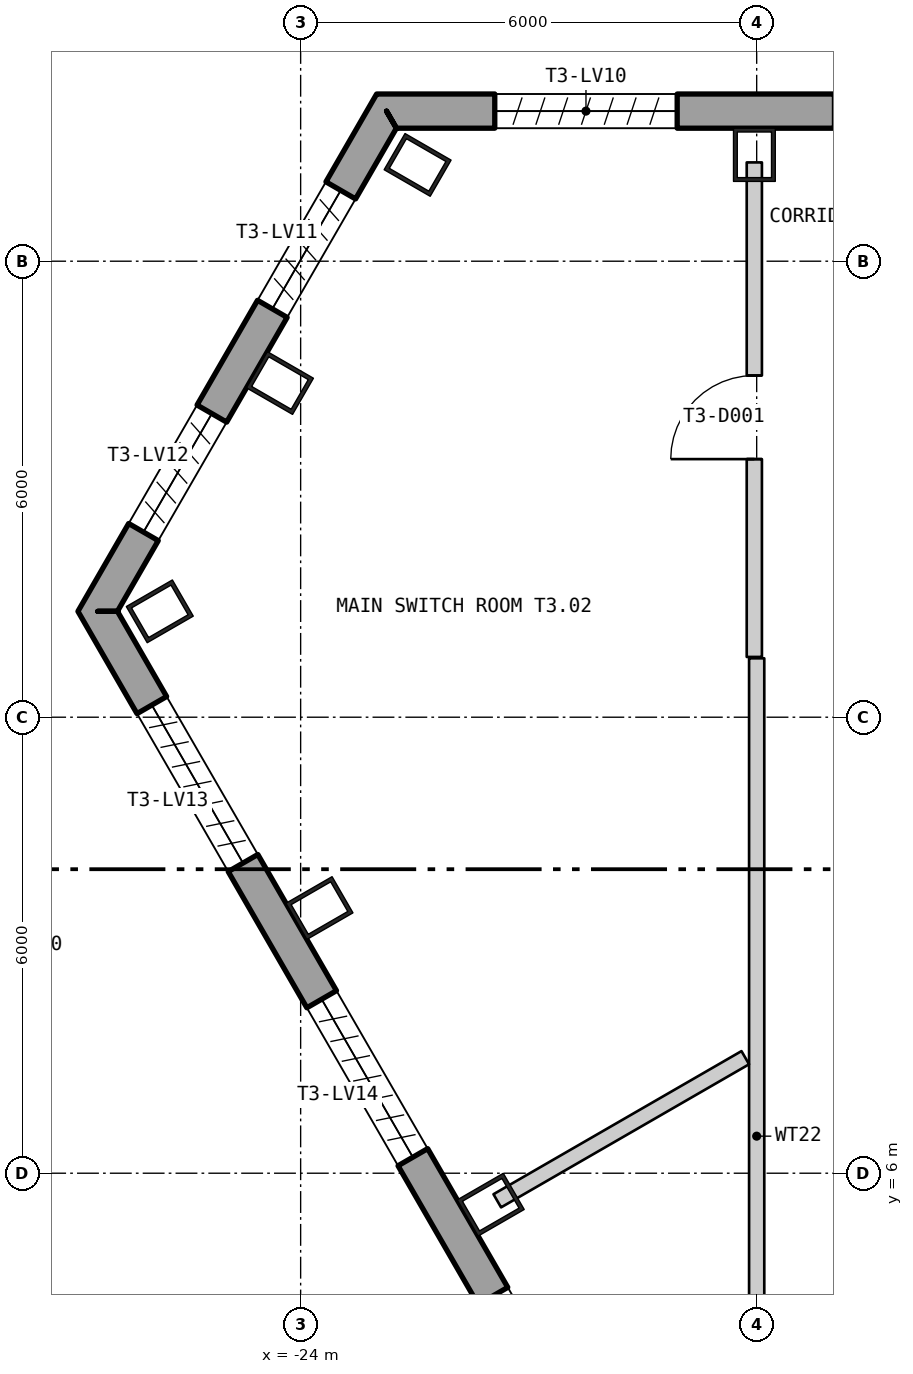
"""IFC4 building model, lengths in metres.
Left out: names, types, materials, properties, quantities, classifications, styles, units other than length and angle.
Written with IfcOpenShell. Run it as: python <this file> out.ifc"""

import sys

from ifc_helpers import new_model, si_unit, direction, frame, frame_2d, origin, origin_2d, place, context, subcontext, project, spatial, polyline, rectangle, hollow_rectangle, outline, extrude, element, fill, save


model = new_model("IFC4")
c1 = context("Model", 3, precision=1e-05, world=origin(), true_north=direction((0.0, 1.0)))
c2 = subcontext(c1, "Body", "Model", "MODEL_VIEW")
j1 = project(units=[si_unit("LENGTHUNIT", "METRE"), si_unit("PLANEANGLEUNIT", "RADIAN")], contexts=[c1])
p1 = place(None, origin())
s1 = spatial("IfcSite", under=j1, at=p1, CompositionType="ELEMENT")
p2 = place(p1, origin())
s2 = spatial("IfcBuilding", under=s1, at=p2, CompositionType="ELEMENT")
p3 = place(p2, frame((0.0, 0.0, 186.6)))
s3 = spatial("IfcBuildingStorey", under=s2, at=p3, CompositionType="ELEMENT", Elevation=186.6)
for number, where, z_axis, x_axis in (
    (1, (-18.03, 19.4, 0.0), (0.0, 0.0, 1.0), (-1.0, 0.0, 0.0)),
    (2, (-22.461, 19.267, 0.0), (0.0, 0.0, 1.0), (-0.5, -0.866, 0.0)),
    (3, (-24.272, 16.397, 0.0), (0.0, 0.0, 1.0), (-0.5, -0.866, 0.0)),
    (4, (-25.853, 13.393, 0.0), (0.0, 0.0, 1.0), (0.5, -0.866, 0.0)),
    (5, (-23.752, 9.489, 0.0), (0.0, 0.0, 1.0), (0.5, -0.866, 0.0)),
    (6, (-21.499, 5.586, 0.0), (0.0, 0.0, 1.0), (0.5, -0.866, 0.0)),
):
    element("IfcColumn", number, at=place(p3, frame(where, z_axis=z_axis, x_axis=x_axis)), inside=s3, PredefinedType="COLUMN", context=c2, shape_type="SweptSolid", body=[
        extrude(hollow_rectangle(XDim=0.55, YDim=0.7, WallThickness=0.05, at=origin_2d()), origin(), (0.0, 0.0, 1.0), 6.0),
    ])
p4 = place(p3, frame((22.87, 19.975, -0.4), z_axis=(0.0, 0.0, 1.0), x_axis=(-1.0, 0.0, 0.0)))
e7 = element("IfcWall", 7, at=p4, inside=s3, PredefinedType="SOLIDWALL", context=c2, shape_type="SweptSolid", body=[
    extrude(outline(polyline([(-0.13, -0.225), (45.87, -0.225), (45.61, 0.225), (0.13, 0.225), (-0.13, -0.225)])), origin(), (0.0, 0.0, 1.0), 6.0),
])
p5 = place(p4, frame((1.424, 0.0, 1.6)))
e8 = element("IfcOpeningElement", 8, at=p5, cuts=e7, PredefinedType="OPENING", context=c2, shape_type="SweptSolid", body=[
    extrude(rectangle(XDim=2.4, YDim=3.6, at=frame_2d((1.2, 1.8))), frame((0.0, 0.235, 0.0), z_axis=(0.0, -1.0, 0.0), x_axis=(1.0, 0.0, 0.0)), (0.0, 0.0, 1.0), 0.47),
])
p6 = place(p4, frame((5.893, 0.0, 1.6)))
e9 = element("IfcOpeningElement", 9, at=p6, cuts=e7, PredefinedType="OPENING", context=c2, shape_type="SweptSolid", body=[
    extrude(rectangle(XDim=2.4, YDim=3.6, at=frame_2d((1.2, 1.8))), frame((0.0, 0.235, 0.0), z_axis=(0.0, -1.0, 0.0), x_axis=(1.0, 0.0, 0.0)), (0.0, 0.0, 1.0), 0.47),
])
p7 = place(p4, frame((10.401, 0.0, 1.6)))
e10 = element("IfcOpeningElement", 10, at=p7, cuts=e7, PredefinedType="OPENING", context=c2, shape_type="SweptSolid", body=[
    extrude(rectangle(XDim=2.4, YDim=3.6, at=frame_2d((1.2, 1.8))), frame((0.0, 0.235, 0.0), z_axis=(0.0, -1.0, 0.0), x_axis=(1.0, 0.0, 0.0)), (0.0, 0.0, 1.0), 0.47),
])
p8 = place(p4, frame((14.909, 0.0, 1.6)))
e11 = element("IfcOpeningElement", 11, at=p8, cuts=e7, PredefinedType="OPENING", context=c2, shape_type="SweptSolid", body=[
    extrude(rectangle(XDim=2.4, YDim=3.6, at=frame_2d((1.2, 1.8))), frame((0.0, 0.235, 0.0), z_axis=(0.0, -1.0, 0.0), x_axis=(1.0, 0.0, 0.0)), (0.0, 0.0, 1.0), 0.47),
])
p9 = place(p4, frame((19.416, 0.0, 1.6)))
e12 = element("IfcOpeningElement", 12, at=p9, cuts=e7, PredefinedType="OPENING", context=c2, shape_type="SweptSolid", body=[
    extrude(rectangle(XDim=2.4, YDim=3.6, at=frame_2d((1.2, 1.8))), frame((0.0, 0.235, 0.0), z_axis=(0.0, -1.0, 0.0), x_axis=(1.0, 0.0, 0.0)), (0.0, 0.0, 1.0), 0.47),
])
p10 = place(p4, frame((23.924, 0.0, 1.6)))
e13 = element("IfcOpeningElement", 13, at=p10, cuts=e7, PredefinedType="OPENING", context=c2, shape_type="SweptSolid", body=[
    extrude(rectangle(XDim=2.4, YDim=3.6, at=frame_2d((1.2, 1.8))), frame((0.0, 0.235, 0.0), z_axis=(0.0, -1.0, 0.0), x_axis=(1.0, 0.0, 0.0)), (0.0, 0.0, 1.0), 0.47),
])
p11 = place(p4, frame((28.431, 0.0, 1.6)))
e14 = element("IfcOpeningElement", 14, at=p11, cuts=e7, PredefinedType="OPENING", context=c2, shape_type="SweptSolid", body=[
    extrude(rectangle(XDim=2.4, YDim=3.6, at=frame_2d((1.2, 1.8))), frame((0.0, 0.235, 0.0), z_axis=(0.0, -1.0, 0.0), x_axis=(1.0, 0.0, 0.0)), (0.0, 0.0, 1.0), 0.47),
])
p12 = place(p4, frame((32.939, 0.0, 1.6)))
e15 = element("IfcOpeningElement", 15, at=p12, cuts=e7, PredefinedType="OPENING", context=c2, shape_type="SweptSolid", body=[
    extrude(rectangle(XDim=2.4, YDim=3.6, at=frame_2d((1.2, 1.8))), frame((0.0, 0.235, 0.0), z_axis=(0.0, -1.0, 0.0), x_axis=(1.0, 0.0, 0.0)), (0.0, 0.0, 1.0), 0.47),
])
p13 = place(p4, frame((37.447, 0.0, 1.6)))
e16 = element("IfcOpeningElement", 16, at=p13, cuts=e7, PredefinedType="OPENING", context=c2, shape_type="SweptSolid", body=[
    extrude(rectangle(XDim=2.4, YDim=3.6, at=frame_2d((1.2, 1.8))), frame((0.0, 0.235, 0.0), z_axis=(0.0, -1.0, 0.0), x_axis=(1.0, 0.0, 0.0)), (0.0, 0.0, 1.0), 0.47),
])
p14 = place(p4, frame((41.916, 0.0, 1.6)))
e17 = element("IfcOpeningElement", 17, at=p14, cuts=e7, PredefinedType="OPENING", context=c2, shape_type="SweptSolid", body=[
    extrude(rectangle(XDim=2.4, YDim=3.6, at=frame_2d((1.2, 1.8))), frame((0.0, 0.235, 0.0), z_axis=(0.0, -1.0, 0.0), x_axis=(1.0, 0.0, 0.0)), (0.0, 0.0, 1.0), 0.47),
])
p15 = place(p3, frame((-22.87, 19.975, -0.4), z_axis=(0.0, 0.0, 1.0), x_axis=(-0.499998078497, -0.866026513162, 0.0)))
e18 = element("IfcWall", 18, at=p15, inside=s3, PredefinedType="SOLIDWALL", context=c2, shape_type="SweptSolid", body=[
    extrude(outline(polyline([(-0.13, -0.225), (7.73, -0.225), (7.47, 0.225), (0.13, 0.225), (-0.13, -0.225)])), origin(), (0.0, 0.0, 1.0), 6.0),
])
p16 = place(p15, frame((1.204, 0.0, 1.6)))
e19 = element("IfcOpeningElement", 19, at=p16, cuts=e18, PredefinedType="OPENING", context=c2, shape_type="SweptSolid", body=[
    extrude(rectangle(XDim=1.8, YDim=3.6, at=frame_2d((0.9, 1.8))), frame((0.0, 0.235, 0.0), z_axis=(0.0, -1.0, 0.0), x_axis=(1.0, 0.0, 0.0)), (0.0, 0.0, 1.0), 0.47),
])
p17 = place(p15, frame((4.596, 0.0, 1.6)))
e20 = element("IfcOpeningElement", 20, at=p17, cuts=e18, PredefinedType="OPENING", context=c2, shape_type="SweptSolid", body=[
    extrude(rectangle(XDim=1.8, YDim=3.6, at=frame_2d((0.9, 1.8))), frame((0.0, 0.235, 0.0), z_axis=(0.0, -1.0, 0.0), x_axis=(1.0, 0.0, 0.0)), (0.0, 0.0, 1.0), 0.47),
])
p18 = place(p3, frame((-26.67, 13.393, -0.18), z_axis=(0.0, 0.0, 1.0), x_axis=(0.500000711659, -0.866024992908, 0.0)))
e21 = element("IfcWall", 21, at=p18, inside=s3, PredefinedType="SOLIDWALL", context=c2, shape_type="SweptSolid", body=[
    extrude(outline(polyline([(-0.13, -0.225), (45.87, -0.225), (45.61, 0.225), (0.13, 0.225), (-0.13, -0.225)])), origin(), (0.0, 0.0, 1.0), 6.0),
])
p19 = place(p18, frame((1.424, 0.0, 1.38)))
e22 = element("IfcOpeningElement", 22, at=p19, cuts=e21, PredefinedType="OPENING", context=c2, shape_type="SweptSolid", body=[
    extrude(rectangle(XDim=2.4, YDim=3.6, at=frame_2d((1.2, 1.8))), frame((0.0, 0.235, 0.0), z_axis=(0.0, -1.0, 0.0), x_axis=(1.0, 0.0, 0.0)), (0.0, 0.0, 1.0), 0.47),
])
p20 = place(p18, frame((5.893, 0.0, 1.38)))
e23 = element("IfcOpeningElement", 23, at=p20, cuts=e21, PredefinedType="OPENING", context=c2, shape_type="SweptSolid", body=[
    extrude(rectangle(XDim=2.4, YDim=3.6, at=frame_2d((1.2, 1.8))), frame((0.0, 0.235, 0.0), z_axis=(0.0, -1.0, 0.0), x_axis=(1.0, 0.0, 0.0)), (0.0, 0.0, 1.0), 0.47),
])
p21 = place(p18, frame((10.401, 0.0, 1.38)))
e24 = element("IfcOpeningElement", 24, at=p21, cuts=e21, PredefinedType="OPENING", context=c2, shape_type="SweptSolid", body=[
    extrude(rectangle(XDim=2.4, YDim=3.6, at=frame_2d((1.2, 1.8))), frame((0.0, 0.235, 0.0), z_axis=(0.0, -1.0, 0.0), x_axis=(1.0, 0.0, 0.0)), (0.0, 0.0, 1.0), 0.47),
])
p22 = place(p18, frame((14.909, 0.0, 1.38)))
e25 = element("IfcOpeningElement", 25, at=p22, cuts=e21, PredefinedType="OPENING", context=c2, shape_type="SweptSolid", body=[
    extrude(rectangle(XDim=2.4, YDim=3.6, at=frame_2d((1.2, 1.8))), frame((0.0, 0.235, 0.0), z_axis=(0.0, -1.0, 0.0), x_axis=(1.0, 0.0, 0.0)), (0.0, 0.0, 1.0), 0.47),
])
p23 = place(p18, frame((19.416, 0.0, 1.38)))
e26 = element("IfcOpeningElement", 26, at=p23, cuts=e21, PredefinedType="OPENING", context=c2, shape_type="SweptSolid", body=[
    extrude(rectangle(XDim=2.4, YDim=3.6, at=frame_2d((1.2, 1.8))), frame((0.0, 0.235, 0.0), z_axis=(0.0, -1.0, 0.0), x_axis=(1.0, 0.0, 0.0)), (0.0, 0.0, 1.0), 0.47),
])
p24 = place(p18, frame((23.924, 0.0, 1.38)))
e27 = element("IfcOpeningElement", 27, at=p24, cuts=e21, PredefinedType="OPENING", context=c2, shape_type="SweptSolid", body=[
    extrude(rectangle(XDim=2.4, YDim=3.6, at=frame_2d((1.2, 1.8))), frame((0.0, 0.235, 0.0), z_axis=(0.0, -1.0, 0.0), x_axis=(1.0, 0.0, 0.0)), (0.0, 0.0, 1.0), 0.47),
])
p25 = place(p18, frame((28.431, 0.0, 1.38)))
e28 = element("IfcOpeningElement", 28, at=p25, cuts=e21, PredefinedType="OPENING", context=c2, shape_type="SweptSolid", body=[
    extrude(rectangle(XDim=2.4, YDim=3.6, at=frame_2d((1.2, 1.8))), frame((0.0, 0.235, 0.0), z_axis=(0.0, -1.0, 0.0), x_axis=(1.0, 0.0, 0.0)), (0.0, 0.0, 1.0), 0.47),
])
p26 = place(p18, frame((32.939, 0.0, 1.38)))
e29 = element("IfcOpeningElement", 29, at=p26, cuts=e21, PredefinedType="OPENING", context=c2, shape_type="SweptSolid", body=[
    extrude(rectangle(XDim=2.4, YDim=3.6, at=frame_2d((1.2, 1.8))), frame((0.0, 0.235, 0.0), z_axis=(0.0, -1.0, 0.0), x_axis=(1.0, 0.0, 0.0)), (0.0, 0.0, 1.0), 0.47),
])
p27 = place(p18, frame((37.447, 0.0, 1.38)))
e30 = element("IfcOpeningElement", 30, at=p27, cuts=e21, PredefinedType="OPENING", context=c2, shape_type="SweptSolid", body=[
    extrude(rectangle(XDim=2.4, YDim=3.6, at=frame_2d((1.2, 1.8))), frame((0.0, 0.235, 0.0), z_axis=(0.0, -1.0, 0.0), x_axis=(1.0, 0.0, 0.0)), (0.0, 0.0, 1.0), 0.47),
])
p28 = place(p18, frame((41.916, 0.0, 1.38)))
e31 = element("IfcOpeningElement", 31, at=p28, cuts=e21, PredefinedType="OPENING", context=c2, shape_type="SweptSolid", body=[
    extrude(rectangle(XDim=2.4, YDim=3.6, at=frame_2d((1.2, 1.8))), frame((0.0, 0.235, 0.0), z_axis=(0.0, -1.0, 0.0), x_axis=(1.0, 0.0, 0.0)), (0.0, 0.0, 1.0), 0.47),
])
p29 = place(p3, frame((-21.413, 5.637, 0.0), z_axis=(0.0, 0.0, 1.0), x_axis=(0.866128132328, 0.499822026716, 0.0)))
e32 = element("IfcWall", 32, at=p29, inside=s3, PredefinedType="PARTITIONING", context=c2, shape_type="SweptSolid", body=[
    extrude(rectangle(XDim=3.767, YDim=0.2, at=frame_2d((1.884, 0.0))), origin(), (0.0, 0.0, 1.0), 5.8),
])
p30 = place(p3, frame((-18.031, 12.793, 0.0), z_axis=(0.0, 0.0, 1.0), x_axis=(0.0, 1.0, 0.0)))
e33 = element("IfcWall", 33, at=p30, inside=s3, PredefinedType="PARTITIONING", context=c2, shape_type="SweptSolid", body=[
    extrude(rectangle(XDim=6.507, YDim=0.2, at=frame_2d((3.253, 0.0))), origin(), (0.0, 0.0, 1.0), 5.8),
])
p31 = place(p30, frame((2.603, 0.0, 0.0)))
e34 = element("IfcOpeningElement", 34, at=p31, cuts=e33, PredefinedType="OPENING", context=c2, shape_type="SweptSolid", body=[
    extrude(rectangle(XDim=1.1, YDim=2.1, at=frame_2d((0.55, 1.05))), frame((0.0, 0.11, 0.0), z_axis=(0.0, -1.0, 0.0), x_axis=(1.0, 0.0, 0.0)), (0.0, 0.0, 1.0), 0.22),
])
p32 = place(p3, frame((-18.0, 0.2, 0.0), z_axis=(0.0, 0.0, 1.0), x_axis=(0.0, 1.0, 0.0)))
e35 = element("IfcWall", 35, at=p32, inside=s3, PredefinedType="PARTITIONING", context=c2, shape_type="SweptSolid", body=[
    extrude(rectangle(XDim=12.575, YDim=0.2, at=frame_2d((6.287, 0.0))), origin(), (0.0, 0.0, 1.0), 5.8),
])
p33 = place(p31, origin())
e36 = element("IfcDoor", 36, at=p33, inside=s3, OperationType="SINGLE_SWING_RIGHT", PredefinedType="DOOR", context=c2, shape_type="SweptSolid", body=[
    extrude(rectangle(XDim=1.1, YDim=2.1, at=frame_2d((0.55, 1.05))), frame((0.0, 0.025, 0.0), z_axis=(0.0, -1.0, 0.0), x_axis=(1.0, 0.0, 0.0)), (0.0, 0.0, 1.0), 0.05),
])
fill(e34, e36)
save(model, sys.argv[1])
